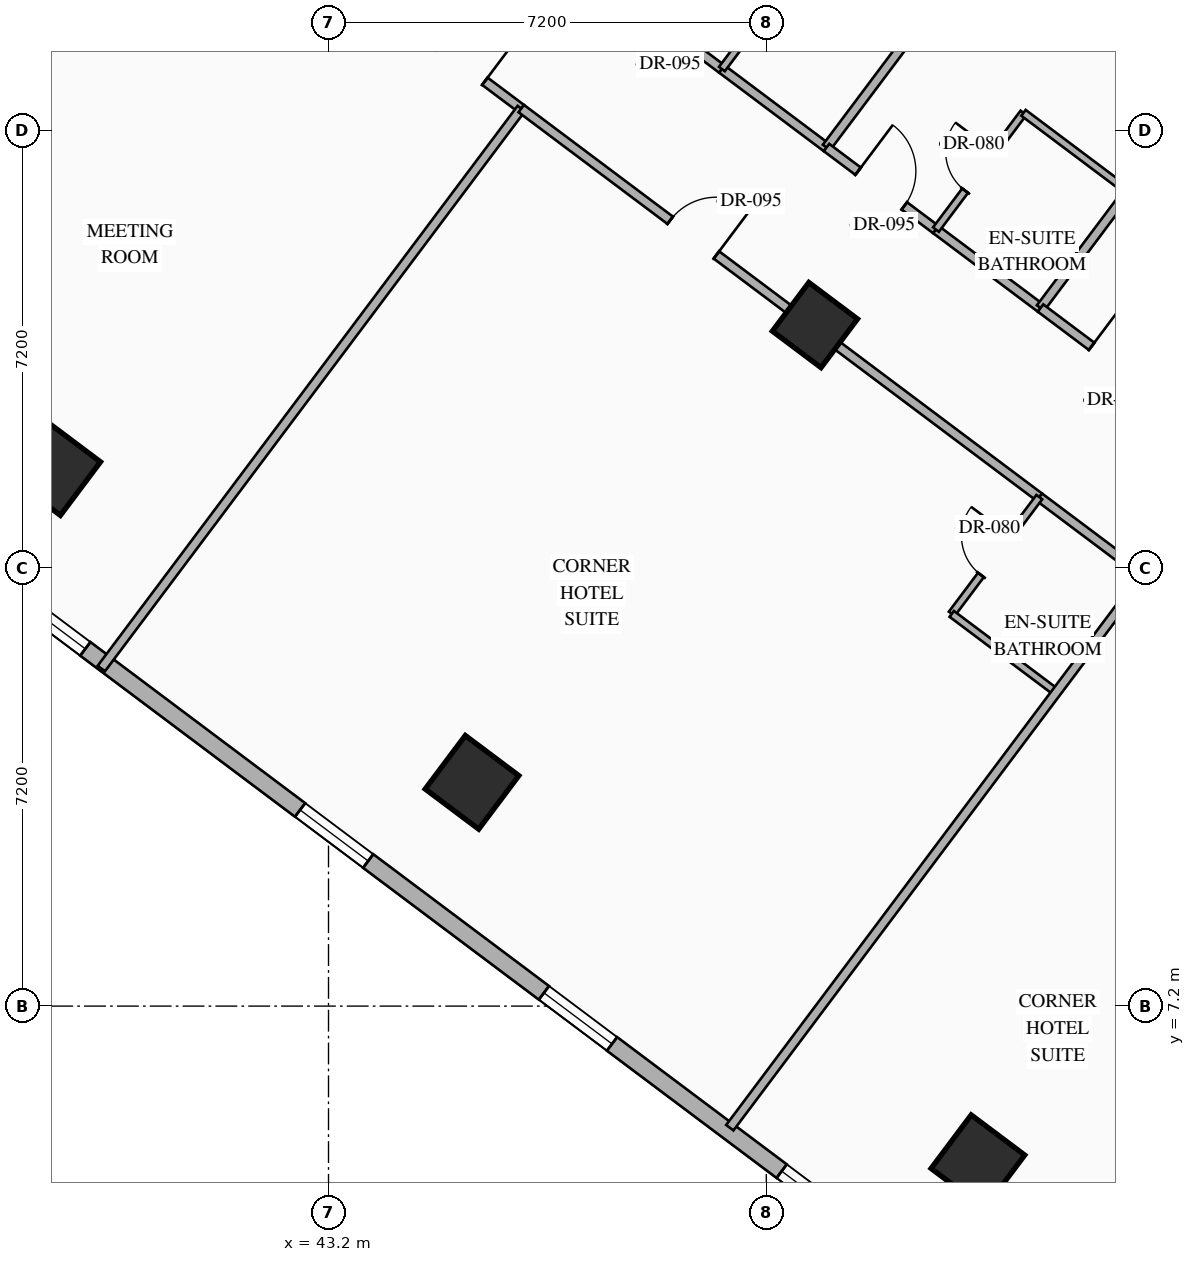
"""IFC4 building model, lengths in metres.
Left out: names, types, materials, properties, quantities, classifications, styles, units other than length and angle.
Written with IfcOpenShell. Run it as: python <this file> out.ifc"""

import sys

from ifc_helpers import new_model, si_unit, direction, frame, frame_2d, origin, origin_2d, place, context, subcontext, project, spatial, rectangle, hollow_rectangle, extrude, element, fill, save


model = new_model("IFC4")
c1 = context("Model", 3, precision=1e-05, world=origin(), true_north=direction((0.0, 1.0)))
c2 = subcontext(c1, "Body", "Model", "MODEL_VIEW")
j1 = project(units=[si_unit("LENGTHUNIT", "METRE"), si_unit("PLANEANGLEUNIT", "RADIAN")], contexts=[c1])
p1 = place(None, origin())
s1 = spatial("IfcSite", under=j1, at=p1, CompositionType="ELEMENT")
p2 = place(p1, origin())
s2 = spatial("IfcBuilding", under=s1, at=p2, CompositionType="ELEMENT")
p3 = place(p2, frame((0.0, 0.0, 46.65)))
s3 = spatial("IfcBuildingStorey", under=s2, at=p3, CompositionType="ELEMENT", Elevation=46.65)
for number, where, z_axis, x_axis in (
    (1, (38.68, 16.04, 0.0), (0.0, 0.0, 1.0), (0.8, -0.6, 0.0)),
    (2, (45.56, 10.88, 0.0), (0.0, 0.0, 1.0), (0.8, -0.6, 0.0)),
):
    element("IfcColumn", number, at=place(p3, frame(where, z_axis=z_axis, x_axis=x_axis)), inside=s3, PredefinedType="COLUMN", context=c2, shape_type="SweptSolid", body=[
        extrude(hollow_rectangle(XDim=1.1, YDim=1.1, WallThickness=0.04, at=origin_2d()), origin(), (0.0, 0.0, 1.0), 3.35),
    ])
p4 = place(p3, frame((51.2, 18.4, 0.0), z_axis=(0.0, 0.0, 1.0), x_axis=(0.799999996291, -0.600000004945, 0.0)))
e3 = element("IfcColumn", 3, at=p4, inside=s3, PredefinedType="COLUMN", context=c2, shape_type="SweptSolid", body=[
    extrude(hollow_rectangle(XDim=1.0, YDim=1.0, WallThickness=0.038, at=origin_2d()), origin(), (0.0, 0.0, 1.0), 3.35),
])
p5 = place(p3, frame((53.88, 4.64, 0.0), z_axis=(0.0, 0.0, 1.0), x_axis=(0.799999996291, -0.600000004945, 0.0)))
e4 = element("IfcColumn", 4, at=p5, inside=s3, PredefinedType="COLUMN", context=c2, shape_type="SweptSolid", body=[
    extrude(hollow_rectangle(XDim=1.1, YDim=1.1, WallThickness=0.04, at=origin_2d()), origin(), (0.0, 0.0, 1.0), 3.35),
])
p6 = place(p3, frame((44.86, 40.73, 0.0), z_axis=(0.0, 0.0, 1.0), x_axis=(0.800006902154, -0.599990797017, 0.0)))
e5 = element("IfcWall", 5, at=p6, inside=s3, PredefinedType="STANDARD", context=c2, shape_type="SweptSolid", body=[
    extrude(rectangle(XDim=29.712, YDim=0.28, at=frame_2d((14.856, 0.0))), origin(), (0.0, 0.0, 1.0), 3.13),
])
p7 = place(p6, frame((14.249, 0.0, 0.0)))
e6 = element("IfcOpeningElement", 6, at=p7, cuts=e5, PredefinedType="OPENING", context=c2, shape_type="SweptSolid", body=[
    extrude(rectangle(XDim=1.1, YDim=2.2, at=frame_2d((0.55, 1.1))), frame((0.0, 0.15, 0.0), z_axis=(0.0, -1.0, 0.0), x_axis=(1.0, 0.0, 0.0)), (0.0, 0.0, 1.0), 0.3),
])
p8 = place(p6, frame((1.612, 0.0, 0.85)))
e7 = element("IfcOpeningElement", 7, at=p8, cuts=e5, PredefinedType="OPENING", context=c2, shape_type="SweptSolid", body=[
    extrude(rectangle(XDim=1.4, YDim=1.8, at=frame_2d((0.7, 0.9))), frame((0.0, 0.15, 0.0), z_axis=(0.0, -1.0, 0.0), x_axis=(1.0, 0.0, 0.0)), (0.0, 0.0, 1.0), 0.3),
])
p9 = place(p6, frame((5.667, 0.0, 0.85)))
e8 = element("IfcOpeningElement", 8, at=p9, cuts=e5, PredefinedType="OPENING", context=c2, shape_type="SweptSolid", body=[
    extrude(rectangle(XDim=1.4, YDim=1.8, at=frame_2d((0.7, 0.9))), frame((0.0, 0.15, 0.0), z_axis=(0.0, -1.0, 0.0), x_axis=(1.0, 0.0, 0.0)), (0.0, 0.0, 1.0), 0.3),
])
p10 = place(p6, frame((9.912, 0.0, 0.85)))
e9 = element("IfcOpeningElement", 9, at=p10, cuts=e5, PredefinedType="OPENING", context=c2, shape_type="SweptSolid", body=[
    extrude(rectangle(XDim=1.4, YDim=1.8, at=frame_2d((0.7, 0.9))), frame((0.0, 0.15, 0.0), z_axis=(0.0, -1.0, 0.0), x_axis=(1.0, 0.0, 0.0)), (0.0, 0.0, 1.0), 0.3),
])
p11 = place(p6, frame((18.803, 0.0, 0.85)))
e10 = element("IfcOpeningElement", 10, at=p11, cuts=e5, PredefinedType="OPENING", context=c2, shape_type="SweptSolid", body=[
    extrude(rectangle(XDim=1.4, YDim=1.8, at=frame_2d((0.7, 0.9))), frame((0.0, 0.15, 0.0), z_axis=(0.0, -1.0, 0.0), x_axis=(1.0, 0.0, 0.0)), (0.0, 0.0, 1.0), 0.3),
])
p12 = place(p6, frame((22.645, 0.0, 0.85)))
e11 = element("IfcOpeningElement", 11, at=p12, cuts=e5, PredefinedType="OPENING", context=c2, shape_type="SweptSolid", body=[
    extrude(rectangle(XDim=1.4, YDim=1.8, at=frame_2d((0.7, 0.9))), frame((0.0, 0.15, 0.0), z_axis=(0.0, -1.0, 0.0), x_axis=(1.0, 0.0, 0.0)), (0.0, 0.0, 1.0), 0.3),
])
p13 = place(p6, frame((27.668, 0.0, 0.85)))
e12 = element("IfcOpeningElement", 12, at=p13, cuts=e5, PredefinedType="OPENING", context=c2, shape_type="SweptSolid", body=[
    extrude(rectangle(XDim=1.4, YDim=1.8, at=frame_2d((0.7, 0.9))), frame((0.0, 0.15, 0.0), z_axis=(0.0, -1.0, 0.0), x_axis=(1.0, 0.0, 0.0)), (0.0, 0.0, 1.0), 0.3),
])
p14 = place(p3, frame((53.318, 2.487, 0.0), z_axis=(0.0, 0.0, 1.0), x_axis=(-0.800004174678, 0.599994433723, 0.0)))
e13 = element("IfcWall", 13, at=p14, inside=s3, PredefinedType="STANDARD", context=c2, shape_type="SweptSolid", body=[
    extrude(rectangle(XDim=35.089, YDim=0.28, at=frame_2d((17.544, 0.0))), origin(), (0.0, 0.0, 1.0), 3.13),
])
p15 = place(p14, frame((1.931, 0.0, 0.85)))
e14 = element("IfcOpeningElement", 14, at=p15, cuts=e13, PredefinedType="OPENING", context=c2, shape_type="SweptSolid", body=[
    extrude(rectangle(XDim=1.4, YDim=1.8, at=frame_2d((0.7, 0.9))), frame((0.0, 0.15, 0.0), z_axis=(0.0, -1.0, 0.0), x_axis=(1.0, 0.0, 0.0)), (0.0, 0.0, 1.0), 0.3),
])
p16 = place(p14, frame((6.819, 0.0, 0.85)))
e15 = element("IfcOpeningElement", 15, at=p16, cuts=e13, PredefinedType="OPENING", context=c2, shape_type="SweptSolid", body=[
    extrude(rectangle(XDim=1.4, YDim=1.8, at=frame_2d((0.7, 0.9))), frame((0.0, 0.15, 0.0), z_axis=(0.0, -1.0, 0.0), x_axis=(1.0, 0.0, 0.0)), (0.0, 0.0, 1.0), 0.3),
])
p17 = place(p14, frame((11.832, 0.0, 0.85)))
e16 = element("IfcOpeningElement", 16, at=p17, cuts=e13, PredefinedType="OPENING", context=c2, shape_type="SweptSolid", body=[
    extrude(rectangle(XDim=1.4, YDim=1.8, at=frame_2d((0.7, 0.9))), frame((0.0, 0.15, 0.0), z_axis=(0.0, -1.0, 0.0), x_axis=(1.0, 0.0, 0.0)), (0.0, 0.0, 1.0), 0.3),
])
p18 = place(p14, frame((17.647, 0.0, 0.85)))
e17 = element("IfcOpeningElement", 17, at=p18, cuts=e13, PredefinedType="OPENING", context=c2, shape_type="SweptSolid", body=[
    extrude(rectangle(XDim=1.4, YDim=1.8, at=frame_2d((0.7, 0.9))), frame((0.0, 0.15, 0.0), z_axis=(0.0, -1.0, 0.0), x_axis=(1.0, 0.0, 0.0)), (0.0, 0.0, 1.0), 0.3),
])
p19 = place(p14, frame((21.857, 0.0, 0.85)))
e18 = element("IfcOpeningElement", 18, at=p19, cuts=e13, PredefinedType="OPENING", context=c2, shape_type="SweptSolid", body=[
    extrude(rectangle(XDim=1.4, YDim=1.8, at=frame_2d((0.7, 0.9))), frame((0.0, 0.15, 0.0), z_axis=(0.0, -1.0, 0.0), x_axis=(1.0, 0.0, 0.0)), (0.0, 0.0, 1.0), 0.3),
])
p20 = place(p14, frame((26.87, 0.0, 0.85)))
e19 = element("IfcOpeningElement", 19, at=p20, cuts=e13, PredefinedType="OPENING", context=c2, shape_type="SweptSolid", body=[
    extrude(rectangle(XDim=1.4, YDim=1.8, at=frame_2d((0.7, 0.9))), frame((0.0, 0.15, 0.0), z_axis=(0.0, -1.0, 0.0), x_axis=(1.0, 0.0, 0.0)), (0.0, 0.0, 1.0), 0.3),
])
p21 = place(p14, frame((31.757, 0.0, 0.85)))
e20 = element("IfcOpeningElement", 20, at=p21, cuts=e13, PredefinedType="OPENING", context=c2, shape_type="SweptSolid", body=[
    extrude(rectangle(XDim=1.4, YDim=1.8, at=frame_2d((0.7, 0.9))), frame((0.0, 0.15, 0.0), z_axis=(0.0, -1.0, 0.0), x_axis=(1.0, 0.0, 0.0)), (0.0, 0.0, 1.0), 0.3),
])
p22 = place(p3, frame((43.037, 24.46, 0.0), z_axis=(0.0, 0.0, 1.0), x_axis=(0.799971872363, -0.600037501685, 0.0)))
e21 = element("IfcWall", 21, at=p22, inside=s3, PredefinedType="PARTITIONING", context=c2, shape_type="SweptSolid", body=[
    extrude(rectangle(XDim=4.167, YDim=0.15, at=frame_2d((2.083, 0.0))), origin(), (0.0, 0.0, 1.0), 2.425),
])
p23 = place(p22, frame((2.468, 0.0, 0.0)))
e22 = element("IfcOpeningElement", 22, at=p23, cuts=e21, PredefinedType="OPENING", context=c2, shape_type="SweptSolid", body=[
    extrude(rectangle(XDim=0.95, YDim=2.15, at=frame_2d((0.475, 1.075))), frame((0.0, 0.085, 0.0), z_axis=(0.0, -1.0, 0.0), x_axis=(1.0, 0.0, 0.0)), (0.0, 0.0, 1.0), 0.17),
])
p24 = place(p3, frame((33.384, 17.312, 0.0), z_axis=(0.0, 0.0, 1.0), x_axis=(0.600008743659, 0.799993442181, 0.0)))
e23 = element("IfcWall", 23, at=p24, inside=s3, PredefinedType="PARTITIONING", context=c2, shape_type="SweptSolid", body=[
    extrude(rectangle(XDim=8.935, YDim=0.15, at=frame_2d((4.468, 0.0))), origin(), (0.0, 0.0, 1.0), 3.13),
])
p25 = place(p3, frame((39.464, 12.752, 0.0), z_axis=(0.0, 0.0, 1.0), x_axis=(0.6, 0.8, 0.0)))
e24 = element("IfcWall", 24, at=p25, inside=s3, PredefinedType="PARTITIONING", context=c2, shape_type="SweptSolid", body=[
    extrude(rectangle(XDim=11.51, YDim=0.15, at=frame_2d((5.755, 0.0))), origin(), (0.0, 0.0, 1.0), 3.13),
])
p26 = place(p3, frame((47.87, 23.96, 0.0), z_axis=(0.0, 0.0, 1.0), x_axis=(0.8, -0.6, 0.0)))
e25 = element("IfcWall", 25, at=p26, inside=s3, PredefinedType="PARTITIONING", context=c2, shape_type="SweptSolid", body=[
    extrude(rectangle(XDim=2.25, YDim=0.15, at=frame_2d((1.125, 0.0))), origin(), (0.0, 0.0, 1.0), 2.775),
])
p27 = place(p26, frame((0.65, 0.0, 0.0)))
e26 = element("IfcOpeningElement", 26, at=p27, cuts=e25, PredefinedType="OPENING", context=c2, shape_type="SweptSolid", body=[
    extrude(rectangle(XDim=0.95, YDim=2.15, at=frame_2d((0.475, 1.075))), frame((0.0, 0.085, 0.0), z_axis=(0.0, -1.0, 0.0), x_axis=(1.0, 0.0, 0.0)), (0.0, 0.0, 1.0), 0.17),
])
p28 = place(p3, frame((49.67, 22.61, 0.0), z_axis=(0.0, 0.0, 1.0), x_axis=(0.79998637334, -0.60001816845, 0.0)))
e27 = element("IfcWall", 27, at=p28, inside=s3, PredefinedType="PARTITIONING", context=c2, shape_type="SweptSolid", body=[
    extrude(rectangle(XDim=2.15, YDim=0.15, at=frame_2d((1.075, 0.0))), origin(), (0.0, 0.0, 1.0), 2.775),
])
p29 = place(p3, frame((49.67, 22.61, 0.0), z_axis=(0.0, 0.0, 1.0), x_axis=(0.600065100855, 0.79995117022, 0.0)))
e28 = element("IfcWall", 28, at=p29, inside=s3, PredefinedType="PARTITIONING", context=c2, shape_type="SweptSolid", body=[
    extrude(rectangle(XDim=2.4, YDim=0.12, at=frame_2d((1.2, 0.0))), origin(), (0.0, 0.0, 1.0), 3.13),
])
p30 = place(p29, frame((0.8, 0.0, 0.0)))
e29 = element("IfcOpeningElement", 29, at=p30, cuts=e28, PredefinedType="OPENING", context=c2, shape_type="SweptSolid", body=[
    extrude(rectangle(XDim=0.8, YDim=2.06, at=frame_2d((0.4, 1.03))), frame((0.0, 0.07, 0.0), z_axis=(0.0, -1.0, 0.0), x_axis=(1.0, 0.0, 0.0)), (0.0, 0.0, 1.0), 0.14),
])
p31 = place(p3, frame((51.39, 21.32, 0.0), z_axis=(0.0, 0.0, 1.0), x_axis=(0.60001014597, 0.799992390422, 0.0)))
e30 = element("IfcWall", 30, at=p31, inside=s3, PredefinedType="PARTITIONING", context=c2, shape_type="SweptSolid", body=[
    extrude(rectangle(XDim=11.55, YDim=0.15, at=frame_2d((5.775, 0.0))), origin(), (0.0, 0.0, 1.0), 3.13),
])
p32 = place(p3, frame((51.39, 21.32, 0.0), z_axis=(0.0, 0.0, 1.0), x_axis=(0.799986979543, -0.600017360216, 0.0)))
e31 = element("IfcWall", 31, at=p32, inside=s3, PredefinedType="PARTITIONING", context=c2, shape_type="SweptSolid", body=[
    extrude(rectangle(XDim=2.25, YDim=0.15, at=frame_2d((1.125, 0.0))), origin(), (0.0, 0.0, 1.0), 2.775),
])
p33 = place(p32, frame((0.65, 0.0, 0.0)))
e32 = element("IfcOpeningElement", 32, at=p33, cuts=e31, PredefinedType="OPENING", context=c2, shape_type="SweptSolid", body=[
    extrude(rectangle(XDim=0.95, YDim=2.15, at=frame_2d((0.475, 1.075))), frame((0.0, 0.085, 0.0), z_axis=(0.0, -1.0, 0.0), x_axis=(1.0, 0.0, 0.0)), (0.0, 0.0, 1.0), 0.17),
])
p34 = place(p3, frame((53.19, 19.97, 0.0), z_axis=(0.0, 0.0, 1.0), x_axis=(0.79998637334, -0.60001816845, 0.0)))
e33 = element("IfcWall", 33, at=p34, inside=s3, PredefinedType="PARTITIONING", context=c2, shape_type="SweptSolid", body=[
    extrude(rectangle(XDim=2.15, YDim=0.15, at=frame_2d((1.075, 0.0))), origin(), (0.0, 0.0, 1.0), 2.775),
])
p35 = place(p3, frame((53.19, 19.97, 0.0), z_axis=(0.0, 0.0, 1.0), x_axis=(0.6, 0.8, 0.0)))
e34 = element("IfcWall", 34, at=p35, inside=s3, PredefinedType="PARTITIONING", context=c2, shape_type="SweptSolid", body=[
    extrude(rectangle(XDim=2.4, YDim=0.12, at=frame_2d((1.2, 0.0))), origin(), (0.0, 0.0, 1.0), 3.13),
])
p36 = place(p35, frame((0.8, 0.0, 0.0)))
e35 = element("IfcOpeningElement", 35, at=p36, cuts=e34, PredefinedType="OPENING", context=c2, shape_type="SweptSolid", body=[
    extrude(rectangle(XDim=0.8, YDim=2.06, at=frame_2d((0.4, 1.03))), frame((0.0, 0.07, 0.0), z_axis=(0.0, -1.0, 0.0), x_axis=(1.0, 0.0, 0.0)), (0.0, 0.0, 1.0), 0.14),
])
p37 = place(p3, frame((54.63, 21.89, 0.0), z_axis=(0.0, 0.0, 1.0), x_axis=(0.800081749437, -0.599890985279, 0.0)))
e36 = element("IfcWall", 36, at=p37, inside=s3, PredefinedType="PARTITIONING", context=c2, shape_type="SweptSolid", body=[
    extrude(rectangle(XDim=2.15, YDim=0.12, at=frame_2d((1.075, 0.0))), origin(), (0.0, 0.0, 1.0), 3.13),
])
p38 = place(p3, frame((54.91, 18.68, 0.0), z_axis=(0.0, 0.0, 1.0), x_axis=(0.60001014597, 0.799992390422, 0.0)))
e37 = element("IfcWall", 37, at=p38, inside=s3, PredefinedType="PARTITIONING", context=c2, shape_type="SweptSolid", body=[
    extrude(rectangle(XDim=11.55, YDim=0.15, at=frame_2d((5.775, 0.0))), origin(), (0.0, 0.0, 1.0), 3.13),
])
p39 = place(p3, frame((54.91, 18.68, 0.0), z_axis=(0.0, 0.0, 1.0), x_axis=(0.800048024332, -0.599935962218, 0.0)))
e38 = element("IfcWall", 38, at=p39, inside=s3, PredefinedType="PARTITIONING", context=c2, shape_type="SweptSolid", body=[
    extrude(rectangle(XDim=3.05, YDim=0.15, at=frame_2d((1.525, 0.0))), origin(), (0.0, 0.0, 1.0), 2.775),
])
p40 = place(p39, frame((1.05, 0.0, 0.0)))
e39 = element("IfcOpeningElement", 39, at=p40, cuts=e38, PredefinedType="OPENING", context=c2, shape_type="SweptSolid", body=[
    extrude(rectangle(XDim=0.95, YDim=2.15, at=frame_2d((0.475, 1.075))), frame((0.0, 0.085, 0.0), z_axis=(0.0, -1.0, 0.0), x_axis=(1.0, 0.0, 0.0)), (0.0, 0.0, 1.0), 0.17),
])
p41 = place(p3, frame((46.37, 21.96, 0.0), z_axis=(0.0, 0.0, 1.0), x_axis=(0.799997249048, -0.600003667918, 0.0)))
e40 = element("IfcWall", 40, at=p41, inside=s3, PredefinedType="PARTITIONING", context=c2, shape_type="SweptSolid", body=[
    extrude(rectangle(XDim=10.65, YDim=0.15, at=frame_2d((5.325, 0.0))), origin(), (0.0, 0.0, 1.0), 2.425),
])
p42 = place(p41, frame((3.062, 0.0, 0.0)))
e41 = element("IfcOpeningElement", 41, at=p42, cuts=e40, PredefinedType="OPENING", context=c2, shape_type="SweptSolid", body=[
    extrude(rectangle(XDim=0.95, YDim=2.15, at=frame_2d((0.475, 1.075))), frame((0.0, 0.085, 0.0), z_axis=(0.0, -1.0, 0.0), x_axis=(1.0, 0.0, 0.0)), (0.0, 0.0, 1.0), 0.17),
])
p43 = place(p3, frame((54.89, 15.57, 0.0), z_axis=(0.0, 0.0, 1.0), x_axis=(0.800027249606, -0.599963665473, 0.0)))
e42 = element("IfcWall", 42, at=p43, inside=s3, PredefinedType="PARTITIONING", context=c2, shape_type="SweptSolid", body=[
    extrude(rectangle(XDim=2.15, YDim=0.15, at=frame_2d((1.075, 0.0))), origin(), (0.0, 0.0, 1.0), 2.425),
])
p44 = place(p3, frame((53.45, 13.65, 0.0), z_axis=(0.0, 0.0, 1.0), x_axis=(0.599951172744, 0.800036618114, 0.0)))
e43 = element("IfcWall", 43, at=p44, inside=s3, PredefinedType="PARTITIONING", context=c2, shape_type="SweptSolid", body=[
    extrude(rectangle(XDim=2.4, YDim=0.12, at=frame_2d((1.2, 0.0))), origin(), (0.0, 0.0, 1.0), 3.13),
])
p45 = place(p44, frame((0.8, 0.0, 0.0)))
e44 = element("IfcOpeningElement", 44, at=p45, cuts=e43, PredefinedType="OPENING", context=c2, shape_type="SweptSolid", body=[
    extrude(rectangle(XDim=0.8, YDim=2.06, at=frame_2d((0.4, 1.03))), frame((0.0, 0.07, 0.0), z_axis=(0.0, -1.0, 0.0), x_axis=(1.0, 0.0, 0.0)), (0.0, 0.0, 1.0), 0.14),
])
p46 = place(p3, frame((53.45, 13.65, 0.0), z_axis=(0.0, 0.0, 1.0), x_axis=(0.800040880289, -0.59994548908, 0.0)))
e45 = element("IfcWall", 45, at=p46, inside=s3, PredefinedType="PARTITIONING", context=c2, shape_type="SweptSolid", body=[
    extrude(rectangle(XDim=2.15, YDim=0.12, at=frame_2d((1.075, 0.0))), origin(), (0.0, 0.0, 1.0), 3.13),
])
p47 = place(p3, frame((49.8, 5.2, 0.0), z_axis=(0.0, 0.0, 1.0), x_axis=(0.6, 0.8, 0.0)))
e46 = element("IfcWall", 46, at=p47, inside=s3, PredefinedType="PARTITIONING", context=c2, shape_type="SweptSolid", body=[
    extrude(rectangle(XDim=11.35, YDim=0.15, at=frame_2d((5.675, 0.0))), origin(), (0.0, 0.0, 1.0), 3.13),
])
p48 = place(p15, origin())
e47 = element("IfcWindow", 47, at=p48, inside=s3, PartitioningType="SINGLE_PANEL", PredefinedType="WINDOW", context=c2, shape_type="SweptSolid", body=[
    extrude(rectangle(XDim=1.4, YDim=1.8, at=frame_2d((0.7, 0.9))), frame((0.0, 0.03, 0.0), z_axis=(0.0, -1.0, 0.0), x_axis=(1.0, 0.0, 0.0)), (0.0, 0.0, 1.0), 0.06),
])
fill(e14, e47)
p49 = place(p16, origin())
e48 = element("IfcWindow", 48, at=p49, inside=s3, PartitioningType="SINGLE_PANEL", PredefinedType="WINDOW", context=c2, shape_type="SweptSolid", body=[
    extrude(rectangle(XDim=1.4, YDim=1.8, at=frame_2d((0.7, 0.9))), frame((0.0, 0.03, 0.0), z_axis=(0.0, -1.0, 0.0), x_axis=(1.0, 0.0, 0.0)), (0.0, 0.0, 1.0), 0.06),
])
fill(e15, e48)
p50 = place(p17, origin())
e49 = element("IfcWindow", 49, at=p50, inside=s3, PartitioningType="SINGLE_PANEL", PredefinedType="WINDOW", context=c2, shape_type="SweptSolid", body=[
    extrude(rectangle(XDim=1.4, YDim=1.8, at=frame_2d((0.7, 0.9))), frame((0.0, 0.03, 0.0), z_axis=(0.0, -1.0, 0.0), x_axis=(1.0, 0.0, 0.0)), (0.0, 0.0, 1.0), 0.06),
])
fill(e16, e49)
p51 = place(p18, origin())
e50 = element("IfcWindow", 50, at=p51, inside=s3, PartitioningType="SINGLE_PANEL", PredefinedType="WINDOW", context=c2, shape_type="SweptSolid", body=[
    extrude(rectangle(XDim=1.4, YDim=1.8, at=frame_2d((0.7, 0.9))), frame((0.0, 0.03, 0.0), z_axis=(0.0, -1.0, 0.0), x_axis=(1.0, 0.0, 0.0)), (0.0, 0.0, 1.0), 0.06),
])
fill(e17, e50)
p52 = place(p23, origin())
e51 = element("IfcDoor", 51, at=p52, inside=s3, OperationType="SINGLE_SWING_RIGHT", PredefinedType="DOOR", context=c2, shape_type="SweptSolid", body=[
    extrude(rectangle(XDim=0.95, YDim=2.15, at=frame_2d((0.475, 1.075))), frame((0.0, 0.025, 0.0), z_axis=(0.0, -1.0, 0.0), x_axis=(1.0, 0.0, 0.0)), (0.0, 0.0, 1.0), 0.05),
])
fill(e22, e51)
p53 = place(p33, origin())
e52 = element("IfcDoor", 52, at=p53, inside=s3, OperationType="SINGLE_SWING_LEFT", PredefinedType="DOOR", context=c2, shape_type="SweptSolid", body=[
    extrude(rectangle(XDim=0.95, YDim=2.15, at=frame_2d((0.475, 1.075))), frame((0.0, 0.025, 0.0), z_axis=(0.0, -1.0, 0.0), x_axis=(1.0, 0.0, 0.0)), (0.0, 0.0, 1.0), 0.05),
])
fill(e32, e52)
p54 = place(p36, origin())
e53 = element("IfcDoor", 53, at=p54, inside=s3, OperationType="SINGLE_SWING_RIGHT", PredefinedType="DOOR", context=c2, shape_type="SweptSolid", body=[
    extrude(rectangle(XDim=0.8, YDim=2.06, at=frame_2d((0.4, 1.03))), frame((0.0, 0.025, 0.0), z_axis=(0.0, -1.0, 0.0), x_axis=(1.0, 0.0, 0.0)), (0.0, 0.0, 1.0), 0.05),
])
fill(e35, e53)
p55 = place(p40, origin())
e54 = element("IfcDoor", 54, at=p55, inside=s3, OperationType="SINGLE_SWING_LEFT", PredefinedType="DOOR", context=c2, shape_type="SweptSolid", body=[
    extrude(rectangle(XDim=0.95, YDim=2.15, at=frame_2d((0.475, 1.075))), frame((0.0, 0.025, 0.0), z_axis=(0.0, -1.0, 0.0), x_axis=(1.0, 0.0, 0.0)), (0.0, 0.0, 1.0), 0.05),
])
fill(e39, e54)
p56 = place(p42, origin())
e55 = element("IfcDoor", 55, at=p56, inside=s3, OperationType="SINGLE_SWING_RIGHT", PredefinedType="DOOR", context=c2, shape_type="SweptSolid", body=[
    extrude(rectangle(XDim=0.95, YDim=2.15, at=frame_2d((0.475, 1.075))), frame((0.0, 0.025, 0.0), z_axis=(0.0, -1.0, 0.0), x_axis=(1.0, 0.0, 0.0)), (0.0, 0.0, 1.0), 0.05),
])
fill(e41, e55)
p57 = place(p45, origin())
e56 = element("IfcDoor", 56, at=p57, inside=s3, OperationType="SINGLE_SWING_RIGHT", PredefinedType="DOOR", context=c2, shape_type="SweptSolid", body=[
    extrude(rectangle(XDim=0.8, YDim=2.06, at=frame_2d((0.4, 1.03))), frame((0.0, 0.025, 0.0), z_axis=(0.0, -1.0, 0.0), x_axis=(1.0, 0.0, 0.0)), (0.0, 0.0, 1.0), 0.05),
])
fill(e44, e56)
save(model, sys.argv[1])
